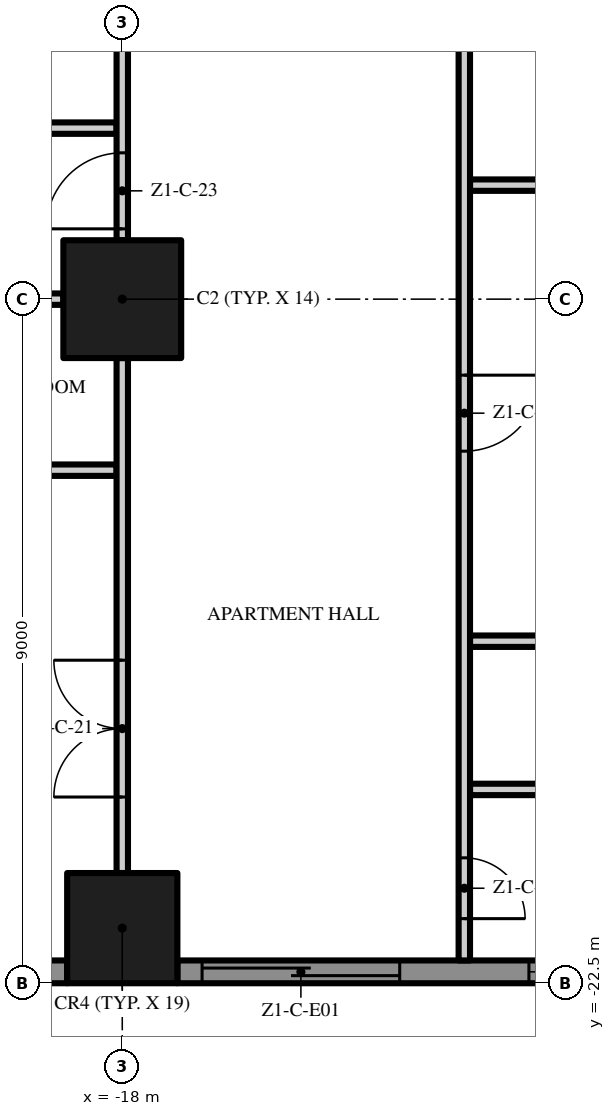
"""IFC4 building model, lengths in metres.
Left out: names, types, materials, properties, quantities, classifications, styles, units other than length and angle.
Written with IfcOpenShell. Run it as: python <this file> out.ifc"""

import sys

from ifc_helpers import new_model, si_unit, direction, frame, frame_2d, origin, origin_2d, place, context, subcontext, project, spatial, polyline, rectangle, outline, extrude, element, fill, save


model = new_model("IFC4")
c1 = context("Model", 3, precision=1e-05, world=origin(), true_north=direction((0.0, 1.0)))
c2 = subcontext(c1, "Body", "Model", "MODEL_VIEW")
j1 = project(units=[si_unit("LENGTHUNIT", "METRE"), si_unit("PLANEANGLEUNIT", "RADIAN")], contexts=[c1])
p1 = place(None, origin())
s1 = spatial("IfcSite", under=j1, at=p1, CompositionType="ELEMENT")
p2 = place(p1, origin())
s2 = spatial("IfcBuilding", under=s1, at=p2, CompositionType="ELEMENT")
p3 = place(p2, frame((0.0, 0.0, 37.8)))
s3 = spatial("IfcBuildingStorey", under=s2, at=p3, CompositionType="ELEMENT", Elevation=37.8)
p4 = place(p3, frame((-18.0, -13.5, 0.0), z_axis=(0.0, 0.0, 1.0), x_axis=(1.0, 0.0, 0.0)))
e1 = element("IfcColumn", 1, at=p4, inside=s3, PredefinedType="COLUMN", context=c2, shape_type="SweptSolid", body=[
    extrude(rectangle(XDim=1.55, YDim=1.55, at=origin_2d()), origin(), (0.0, 0.0, 1.0), 3.5),
])
p5 = place(p3, frame((-18.0, -21.775, 0.0), z_axis=(0.0, 0.0, 1.0), x_axis=(1.0, 0.0, 0.0)))
e2 = element("IfcColumn", 2, at=p5, inside=s3, PredefinedType="COLUMN", context=c2, shape_type="SweptSolid", body=[
    extrude(rectangle(XDim=1.45, YDim=1.45, at=origin_2d()), origin(), (0.0, 0.0, 1.0), 3.5),
])
p6 = place(p3, frame((-18.725, -22.35, 0.0), z_axis=(0.0, 0.0, 1.0), x_axis=(-1.0, 0.0, 0.0)))
e3 = element("IfcWall", 3, at=p6, inside=s3, PredefinedType="SOLIDWALL", context=c2, shape_type="SweptSolid", body=[
    extrude(rectangle(XDim=3.475, YDim=0.3, at=frame_2d((1.738, 0.0))), origin(), (0.0, 0.0, 1.0), 3.5),
])
p7 = place(p6, frame((0.325, 0.0, 0.45)))
e4 = element("IfcOpeningElement", 4, at=p7, cuts=e3, PredefinedType="OPENING", context=c2, shape_type="SweptSolid", body=[
    extrude(rectangle(XDim=2.6, YDim=2.65, at=frame_2d((1.3, 1.325))), frame((0.0, 0.16, 0.0), z_axis=(0.0, -1.0, 0.0), x_axis=(1.0, 0.0, 0.0)), (0.0, 0.0, 1.0), 0.32),
])
p8 = place(p3, frame((-9.725, -22.35, 0.0), z_axis=(0.0, 0.0, 1.0), x_axis=(-1.0, 0.0, 0.0)))
e5 = element("IfcWall", 5, at=p8, inside=s3, PredefinedType="SOLIDWALL", context=c2, shape_type="SweptSolid", body=[
    extrude(rectangle(XDim=7.55, YDim=0.3, at=frame_2d((3.775, 0.0))), origin(), (0.0, 0.0, 1.0), 3.5),
])
p9 = place(p8, frame((4.625, 0.0, 0.0)))
e6 = element("IfcOpeningElement", 6, at=p9, cuts=e5, PredefinedType="OPENING", context=c2, shape_type="SweptSolid", body=[
    extrude(rectangle(XDim=2.6, YDim=2.4, at=frame_2d((1.3, 1.2))), frame((0.0, 0.16, 0.0), z_axis=(0.0, -1.0, 0.0), x_axis=(1.0, 0.0, 0.0)), (0.0, 0.0, 1.0), 0.32),
])
p10 = place(p8, frame((0.325, 0.0, 0.45)))
e7 = element("IfcOpeningElement", 7, at=p10, cuts=e5, PredefinedType="OPENING", context=c2, shape_type="SweptSolid", body=[
    extrude(rectangle(XDim=2.6, YDim=2.65, at=frame_2d((1.3, 1.325))), frame((0.0, 0.16, 0.0), z_axis=(0.0, -1.0, 0.0), x_axis=(1.0, 0.0, 0.0)), (0.0, 0.0, 1.0), 0.32),
])
p11 = place(p3, origin())
e8 = element("IfcWall", 8, at=p11, inside=s3, PredefinedType="USERDEFINED", context=c2, shape_type="SweptSolid", body=[
    extrude(outline(polyline([(-22.5, -23.1), (-21.0, -23.329), (-19.5, -23.929), (-18.0, -24.671), (-16.5, -25.271), (-15.0, -25.5), (-13.5, -25.271), (-12.0, -24.671), (-10.5, -23.929), (-9.0, -23.329), (-7.5, -23.1), (-6.0, -23.329), (-4.5, -23.929), (-3.0, -24.671), (-1.5, -25.271), (0.0, -25.5), (1.5, -25.271), (3.0, -24.671), (4.5, -23.929), (6.0, -23.329), (7.5, -23.1), (9.0, -23.329), (10.5, -23.929), (12.0, -24.671), (13.5, -25.271), (15.0, -25.5), (16.5, -25.271), (18.0, -24.671), (19.5, -23.929), (21.0, -23.329), (22.5, -23.1), (22.462, -22.853), (20.934, -23.086), (19.398, -23.701), (17.898, -24.442), (16.434, -25.028), (15.0, -25.247), (13.566, -25.028), (12.102, -24.442), (10.602, -23.701), (9.066, -23.086), (7.5, -22.847), (5.934, -23.086), (4.398, -23.701), (2.898, -24.442), (1.434, -25.028), (0.0, -25.247), (-1.434, -25.028), (-2.898, -24.442), (-4.398, -23.701), (-5.934, -23.086), (-7.5, -22.847), (-9.066, -23.086), (-10.602, -23.701), (-12.102, -24.442), (-13.566, -25.028), (-15.0, -25.247), (-16.434, -25.028), (-17.898, -24.442), (-19.398, -23.701), (-20.934, -23.086), (-22.462, -22.853), (-22.5, -23.1)])), origin(), (0.0, 0.0, 1.0), 0.9),
])
for number, where, z_axis, x_axis in (
    (9, (-13.425, -19.95, 0.0), (0.0, 0.0, 1.0), (1.0, 0.0, 0.0)),
    (10, (-13.425, -18.0, 0.0), (0.0, 0.0, 1.0), (1.0, 0.0, 0.0)),
):
    element("IfcWall", number, at=place(p3, frame(where, z_axis=z_axis, x_axis=x_axis)), inside=s3, PredefinedType="PARTITIONING", context=c2, shape_type="SweptSolid", body=[
        extrude(rectangle(XDim=4.35, YDim=0.15, at=frame_2d((2.175, 0.0))), origin(), (0.0, 0.0, 1.0), 3.5),
    ])
p12 = place(p3, frame((-20.925, -15.75, 0.0), z_axis=(0.0, 0.0, 1.0), x_axis=(1.0, 0.0, 0.0)))
e11 = element("IfcWall", 11, at=p12, inside=s3, PredefinedType="PARTITIONING", context=c2, shape_type="SweptSolid", body=[
    extrude(rectangle(XDim=2.85, YDim=0.15, at=frame_2d((1.425, 0.0))), origin(), (0.0, 0.0, 1.0), 3.5),
])
p13 = place(p3, frame((-25.55, -13.5, 0.0), z_axis=(0.0, 0.0, 1.0), x_axis=(1.0, 0.0, 0.0)))
e12 = element("IfcWall", 12, at=p13, inside=s3, PredefinedType="PARTITIONING", context=c2, shape_type="SweptSolid", body=[
    extrude(rectangle(XDim=6.775, YDim=0.15, at=frame_2d((3.388, 0.0))), origin(), (0.0, 0.0, 1.0), 3.5),
])
p14 = place(p3, frame((-13.425, -12.0, 0.0), z_axis=(0.0, 0.0, 1.0), x_axis=(1.0, 0.0, 0.0)))
e13 = element("IfcWall", 13, at=p14, inside=s3, PredefinedType="PARTITIONING", context=c2, shape_type="SweptSolid", body=[
    extrude(rectangle(XDim=4.35, YDim=0.15, at=frame_2d((2.175, 0.0))), origin(), (0.0, 0.0, 1.0), 3.5),
])
p15 = place(p3, frame((-20.925, -11.25, 0.0), z_axis=(0.0, 0.0, 1.0), x_axis=(1.0, 0.0, 0.0)))
e14 = element("IfcWall", 14, at=p15, inside=s3, PredefinedType="PARTITIONING", context=c2, shape_type="SweptSolid", body=[
    extrude(rectangle(XDim=2.85, YDim=0.15, at=frame_2d((1.425, 0.0))), origin(), (0.0, 0.0, 1.0), 3.5),
])
p16 = place(p3, frame((-18.0, -21.05, 0.0), z_axis=(0.0, 0.0, 1.0), x_axis=(0.0, 1.0, 0.0)))
e15 = element("IfcWall", 15, at=p16, inside=s3, PredefinedType="PARTITIONING", context=c2, shape_type="SweptSolid", body=[
    extrude(rectangle(XDim=6.775, YDim=0.15, at=frame_2d((3.388, 0.0))), origin(), (0.0, 0.0, 1.0), 3.5),
])
p17 = place(p16, frame((1.0, 0.0, 0.0)))
e16 = element("IfcOpeningElement", 16, at=p17, cuts=e15, PredefinedType="OPENING", context=c2, shape_type="SweptSolid", body=[
    extrude(rectangle(XDim=1.8, YDim=2.4, at=frame_2d((0.9, 1.2))), frame((0.0, 0.085, 0.0), z_axis=(0.0, -1.0, 0.0), x_axis=(1.0, 0.0, 0.0)), (0.0, 0.0, 1.0), 0.17),
])
p18 = place(p3, frame((-18.0, -12.725, 0.0), z_axis=(0.0, 0.0, 1.0), x_axis=(0.0, 1.0, 0.0)))
e17 = element("IfcWall", 17, at=p18, inside=s3, PredefinedType="PARTITIONING", context=c2, shape_type="SweptSolid", body=[
    extrude(rectangle(XDim=7.45, YDim=0.15, at=frame_2d((3.725, 0.0))), origin(), (0.0, 0.0, 1.0), 3.5),
])
p19 = place(p18, frame((0.15, 0.0, 0.0)))
e18 = element("IfcOpeningElement", 18, at=p19, cuts=e17, PredefinedType="OPENING", context=c2, shape_type="SweptSolid", body=[
    extrude(rectangle(XDim=1.0, YDim=2.4, at=frame_2d((0.5, 1.2))), frame((0.0, 0.085, 0.0), z_axis=(0.0, -1.0, 0.0), x_axis=(1.0, 0.0, 0.0)), (0.0, 0.0, 1.0), 0.17),
])
p20 = place(p18, frame((6.3, 0.0, 0.0)))
e19 = element("IfcOpeningElement", 19, at=p20, cuts=e17, PredefinedType="OPENING", context=c2, shape_type="SweptSolid", body=[
    extrude(rectangle(XDim=1.0, YDim=2.4, at=frame_2d((0.5, 1.2))), frame((0.0, 0.085, 0.0), z_axis=(0.0, -1.0, 0.0), x_axis=(1.0, 0.0, 0.0)), (0.0, 0.0, 1.0), 0.17),
])
p21 = place(p3, frame((-13.5, -9.675, 0.0), z_axis=(0.0, 0.0, 1.0), x_axis=(0.0, -1.0, 0.0)))
e20 = element("IfcWall", 20, at=p21, inside=s3, PredefinedType="PARTITIONING", context=c2, shape_type="SweptSolid", body=[
    extrude(rectangle(XDim=12.525, YDim=0.15, at=frame_2d((6.263, 0.0))), origin(), (0.0, 0.0, 1.0), 3.5),
])
p22 = place(p21, frame((11.175, 0.0, 0.0)))
e21 = element("IfcOpeningElement", 21, at=p22, cuts=e20, PredefinedType="OPENING", context=c2, shape_type="SweptSolid", body=[
    extrude(rectangle(XDim=0.8, YDim=2.0, at=frame_2d((0.4, 1.0))), frame((0.0, 0.085, 0.0), z_axis=(0.0, -1.0, 0.0), x_axis=(1.0, 0.0, 0.0)), (0.0, 0.0, 1.0), 0.17),
])
p23 = place(p21, frame((4.825, 0.0, 0.0)))
e22 = element("IfcOpeningElement", 22, at=p23, cuts=e20, PredefinedType="OPENING", context=c2, shape_type="SweptSolid", body=[
    extrude(rectangle(XDim=1.0, YDim=2.4, at=frame_2d((0.5, 1.2))), frame((0.0, 0.085, 0.0), z_axis=(0.0, -1.0, 0.0), x_axis=(1.0, 0.0, 0.0)), (0.0, 0.0, 1.0), 0.17),
])
p24 = place(p9, origin())
e23 = element("IfcDoor", 23, at=p24, inside=s3, OperationType="SINGLE_SWING_LEFT", PredefinedType="DOOR", context=c2, shape_type="SweptSolid", body=[
    extrude(rectangle(XDim=2.6, YDim=2.4, at=frame_2d((1.3, 1.2))), frame((0.0, 0.025, 0.0), z_axis=(0.0, -1.0, 0.0), x_axis=(1.0, 0.0, 0.0)), (0.0, 0.0, 1.0), 0.05),
])
fill(e6, e23)
p25 = place(p10, origin())
e24 = element("IfcWindow", 24, at=p25, inside=s3, PartitioningType="SINGLE_PANEL", PredefinedType="WINDOW", context=c2, shape_type="SweptSolid", body=[
    extrude(rectangle(XDim=2.6, YDim=2.65, at=frame_2d((1.3, 1.325))), frame((0.0, 0.03, 0.0), z_axis=(0.0, -1.0, 0.0), x_axis=(1.0, 0.0, 0.0)), (0.0, 0.0, 1.0), 0.06),
])
fill(e7, e24)
p26 = place(p22, origin())
e25 = element("IfcDoor", 25, at=p26, inside=s3, OperationType="SINGLE_SWING_RIGHT", PredefinedType="DOOR", context=c2, shape_type="SweptSolid", body=[
    extrude(rectangle(XDim=0.8, YDim=2.0, at=frame_2d((0.4, 1.0))), frame((0.0, 0.025, 0.0), z_axis=(0.0, -1.0, 0.0), x_axis=(1.0, 0.0, 0.0)), (0.0, 0.0, 1.0), 0.05),
])
fill(e21, e25)
p27 = place(p23, origin())
e26 = element("IfcDoor", 26, at=p27, inside=s3, OperationType="SINGLE_SWING_LEFT", PredefinedType="DOOR", context=c2, shape_type="SweptSolid", body=[
    extrude(rectangle(XDim=1.0, YDim=2.4, at=frame_2d((0.5, 1.2))), frame((0.0, 0.025, 0.0), z_axis=(0.0, -1.0, 0.0), x_axis=(1.0, 0.0, 0.0)), (0.0, 0.0, 1.0), 0.05),
])
fill(e22, e26)
p28 = place(p17, origin())
e27 = element("IfcDoor", 27, at=p28, inside=s3, OperationType="DOUBLE_DOOR_SINGLE_SWING", PredefinedType="DOOR", context=c2, shape_type="SweptSolid", body=[
    extrude(rectangle(XDim=1.8, YDim=2.4, at=frame_2d((0.9, 1.2))), frame((0.0, 0.025, 0.0), z_axis=(0.0, -1.0, 0.0), x_axis=(1.0, 0.0, 0.0)), (0.0, 0.0, 1.0), 0.05),
])
fill(e16, e27)
p29 = place(p19, origin())
e28 = element("IfcDoor", 28, at=p29, inside=s3, OperationType="SINGLE_SWING_LEFT", PredefinedType="DOOR", context=c2, shape_type="SweptSolid", body=[
    extrude(rectangle(XDim=1.0, YDim=2.4, at=frame_2d((0.5, 1.2))), frame((0.0, 0.025, 0.0), z_axis=(0.0, -1.0, 0.0), x_axis=(1.0, 0.0, 0.0)), (0.0, 0.0, 1.0), 0.05),
])
fill(e18, e28)
save(model, sys.argv[1])
